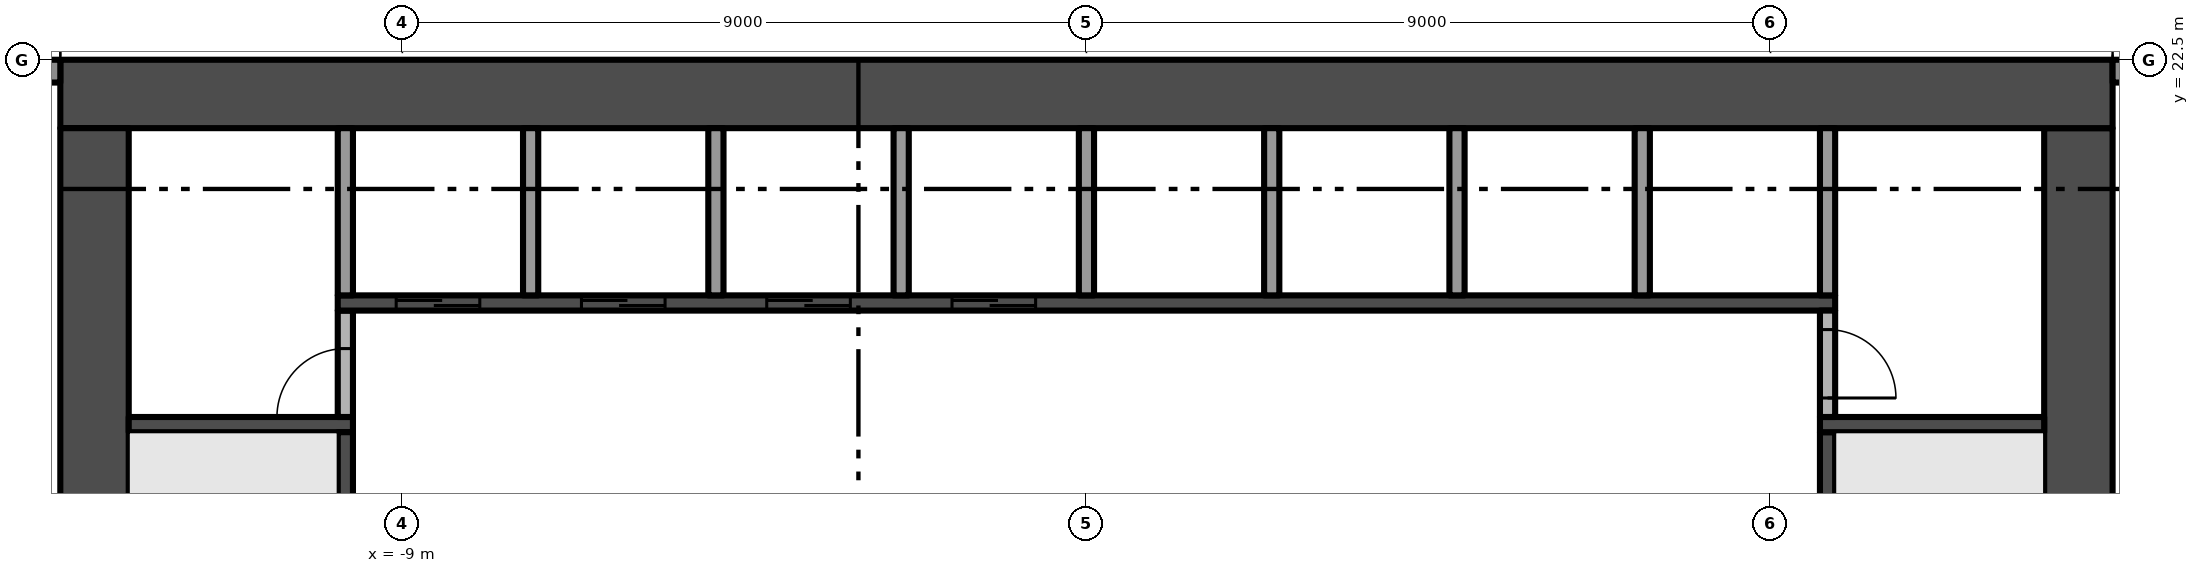
"""IFC4 building model, lengths in metres.
Left out: names, types, materials, properties, quantities, classifications, styles, units other than length and angle.
Written with IfcOpenShell. Run it as: python <this file> out.ifc"""

import sys

from ifc_helpers import new_model, si_unit, direction, frame, frame_2d, origin, place, context, subcontext, project, spatial, rectangle, extrude, element, fill, save


model = new_model("IFC4")
c1 = context("Model", 3, precision=1e-05, world=origin(), true_north=direction((0.0, 1.0)))
c2 = subcontext(c1, "Body", "Model", "MODEL_VIEW")
j1 = project(units=[si_unit("LENGTHUNIT", "METRE"), si_unit("PLANEANGLEUNIT", "RADIAN")], contexts=[c1])
p1 = place(None, origin())
s1 = spatial("IfcSite", under=j1, at=p1, CompositionType="ELEMENT")
p2 = place(p1, origin())
s2 = spatial("IfcBuilding", under=s1, at=p2, CompositionType="ELEMENT")
p3 = place(p2, frame((0.0, 0.0, 37.8)))
s3 = spatial("IfcBuildingStorey", under=s2, at=p3, CompositionType="ELEMENT", Elevation=37.8)
p4 = place(p3, frame((13.05, 5.4, -0.3), z_axis=(0.0, 0.0, 1.0), x_axis=(0.0, 1.0, 0.0)))
e1 = element("IfcWall", 1, at=p4, inside=s3, PredefinedType="SHEAR", context=c2, shape_type="SweptSolid", body=[
    extrude(rectangle(XDim=16.2, YDim=0.9, at=frame_2d((8.1, 0.0))), origin(), (0.0, 0.0, 1.0), 3.8),
])
p5 = place(p4, frame((6.0, 0.0, 0.3)))
e2 = element("IfcOpeningElement", 2, at=p5, cuts=e1, PredefinedType="OPENING", context=c2, shape_type="SweptSolid", body=[
    extrude(rectangle(XDim=1.2, YDim=2.2, at=frame_2d((0.6, 1.1))), frame((0.0, 0.46, 0.0), z_axis=(0.0, -1.0, 0.0), x_axis=(1.0, 0.0, 0.0)), (0.0, 0.0, 1.0), 0.92),
])
p6 = place(p3, frame((13.5, 22.05, -0.3), z_axis=(0.0, 0.0, 1.0), x_axis=(-1.0, 0.0, 0.0)))
e3 = element("IfcWall", 3, at=p6, inside=s3, PredefinedType="SHEAR", context=c2, shape_type="SweptSolid", body=[
    extrude(rectangle(XDim=27.0, YDim=0.9, at=frame_2d((13.5, 0.0))), origin(), (0.0, 0.0, 1.0), 3.8),
])
p7 = place(p3, frame((-13.05, 21.6, -0.3), z_axis=(0.0, 0.0, 1.0), x_axis=(0.0, -1.0, 0.0)))
e4 = element("IfcWall", 4, at=p7, inside=s3, PredefinedType="SHEAR", context=c2, shape_type="SweptSolid", body=[
    extrude(rectangle(XDim=16.2, YDim=0.9, at=frame_2d((8.1, 0.0))), origin(), (0.0, 0.0, 1.0), 3.8),
])
p8 = place(p7, frame((9.0, 0.0, 0.3)))
e5 = element("IfcOpeningElement", 5, at=p8, cuts=e4, PredefinedType="OPENING", context=c2, shape_type="SweptSolid", body=[
    extrude(rectangle(XDim=1.2, YDim=2.2, at=frame_2d((0.6, 1.1))), frame((0.0, 0.46, 0.0), z_axis=(0.0, -1.0, 0.0), x_axis=(1.0, 0.0, 0.0)), (0.0, 0.0, 1.0), 0.92),
])
p9 = place(p3, frame((13.5, 22.35, 0.0), z_axis=(0.0, 0.0, 1.0), x_axis=(1.0, 0.0, 0.0)))
e6 = element("IfcWall", 6, at=p9, inside=s3, PredefinedType="SOLIDWALL", context=c2, shape_type="SweptSolid", body=[
    extrude(rectangle(XDim=3.775, YDim=0.3, at=frame_2d((1.887, 0.0))), origin(), (0.0, 0.0, 1.0), 3.5),
])
p10 = place(p9, frame((0.85, 0.0, 0.0)))
e7 = element("IfcOpeningElement", 7, at=p10, cuts=e6, PredefinedType="OPENING", context=c2, shape_type="SweptSolid", body=[
    extrude(rectangle(XDim=2.6, YDim=2.4, at=frame_2d((1.3, 1.2))), frame((0.0, 0.16, 0.0), z_axis=(0.0, -1.0, 0.0), x_axis=(1.0, 0.0, 0.0)), (0.0, 0.0, 1.0), 0.32),
])
p11 = place(p3, frame((-17.275, 22.35, 0.0), z_axis=(0.0, 0.0, 1.0), x_axis=(1.0, 0.0, 0.0)))
e8 = element("IfcWall", 8, at=p11, inside=s3, PredefinedType="SOLIDWALL", context=c2, shape_type="SweptSolid", body=[
    extrude(rectangle(XDim=3.775, YDim=0.3, at=frame_2d((1.887, 0.0))), origin(), (0.0, 0.0, 1.0), 3.5),
])
p12 = place(p11, frame((0.325, 0.0, 0.45)))
e9 = element("IfcOpeningElement", 9, at=p12, cuts=e8, PredefinedType="OPENING", context=c2, shape_type="SweptSolid", body=[
    extrude(rectangle(XDim=2.6, YDim=2.65, at=frame_2d((1.3, 1.325))), frame((0.0, 0.16, 0.0), z_axis=(0.0, -1.0, 0.0), x_axis=(1.0, 0.0, 0.0)), (0.0, 0.0, 1.0), 0.32),
])
p13 = place(p3, frame((-12.6, 17.7, 0.0), z_axis=(0.0, 0.0, 1.0), x_axis=(1.0, 0.0, 0.0)))
e10 = element("IfcWall", 10, at=p13, inside=s3, PredefinedType="SHEAR", context=c2, shape_type="SweptSolid", body=[
    extrude(rectangle(XDim=2.95, YDim=0.2, at=frame_2d((1.475, 0.0))), origin(), (0.0, 0.0, 1.0), 3.5),
])
p14 = place(p3, frame((-9.75, 16.1, 0.0), z_axis=(0.0, 0.0, 1.0), x_axis=(0.0, 1.0, 0.0)))
e11 = element("IfcWall", 11, at=p14, inside=s3, PredefinedType="SHEAR", context=c2, shape_type="SweptSolid", body=[
    extrude(rectangle(XDim=1.5, YDim=0.2, at=frame_2d((0.75, 0.0))), origin(), (0.0, 0.0, 1.0), 3.5),
])
p15 = place(p3, frame((-9.75, 17.8, 0.0), z_axis=(0.0, 0.0, 1.0), x_axis=(0.0, 1.0, 0.0)))
e12 = element("IfcWall", 12, at=p15, inside=s3, PredefinedType="PARTITIONING", context=c2, shape_type="SweptSolid", body=[
    extrude(rectangle(XDim=1.4, YDim=0.2, at=frame_2d((0.7, 0.0))), origin(), (0.0, 0.0, 1.0), 3.5),
])
p16 = place(p15, origin())
e13 = element("IfcOpeningElement", 13, at=p16, cuts=e12, PredefinedType="OPENING", context=c2, shape_type="SweptSolid", body=[
    extrude(rectangle(XDim=0.9, YDim=2.1, at=frame_2d((0.45, 1.05))), frame((0.0, 0.11, 0.0), z_axis=(0.0, -1.0, 0.0), x_axis=(1.0, 0.0, 0.0)), (0.0, 0.0, 1.0), 0.22),
])
p17 = place(p3, frame((-9.85, 19.3, 0.0), z_axis=(0.0, 0.0, 1.0), x_axis=(1.0, 0.0, 0.0)))
e14 = element("IfcWall", 14, at=p17, inside=s3, PredefinedType="SHEAR", context=c2, shape_type="SweptSolid", body=[
    extrude(rectangle(XDim=19.7, YDim=0.2, at=frame_2d((9.85, 0.0))), origin(), (0.0, 0.0, 1.0), 3.5),
])
p18 = place(p17, frame((0.769, 0.0, 0.0)))
e15 = element("IfcOpeningElement", 15, at=p18, cuts=e14, PredefinedType="OPENING", context=c2, shape_type="SweptSolid", body=[
    extrude(rectangle(XDim=1.1, YDim=2.1, at=frame_2d((0.55, 1.05))), frame((0.0, 0.11, 0.0), z_axis=(0.0, -1.0, 0.0), x_axis=(1.0, 0.0, 0.0)), (0.0, 0.0, 1.0), 0.22),
])
p19 = place(p17, frame((3.206, 0.0, 0.0)))
e16 = element("IfcOpeningElement", 16, at=p19, cuts=e14, PredefinedType="OPENING", context=c2, shape_type="SweptSolid", body=[
    extrude(rectangle(XDim=1.1, YDim=2.1, at=frame_2d((0.55, 1.05))), frame((0.0, 0.11, 0.0), z_axis=(0.0, -1.0, 0.0), x_axis=(1.0, 0.0, 0.0)), (0.0, 0.0, 1.0), 0.22),
])
p20 = place(p17, frame((5.644, 0.0, 0.0)))
e17 = element("IfcOpeningElement", 17, at=p20, cuts=e14, PredefinedType="OPENING", context=c2, shape_type="SweptSolid", body=[
    extrude(rectangle(XDim=1.1, YDim=2.1, at=frame_2d((0.55, 1.05))), frame((0.0, 0.11, 0.0), z_axis=(0.0, -1.0, 0.0), x_axis=(1.0, 0.0, 0.0)), (0.0, 0.0, 1.0), 0.22),
])
p21 = place(p17, frame((8.081, 0.0, 0.0)))
e18 = element("IfcOpeningElement", 18, at=p21, cuts=e14, PredefinedType="OPENING", context=c2, shape_type="SweptSolid", body=[
    extrude(rectangle(XDim=1.1, YDim=2.1, at=frame_2d((0.55, 1.05))), frame((0.0, 0.11, 0.0), z_axis=(0.0, -1.0, 0.0), x_axis=(1.0, 0.0, 0.0)), (0.0, 0.0, 1.0), 0.22),
])
for number, where, z_axis, x_axis in (
    (19, (-9.75, 19.4, 0.0), (0.0, 0.0, 1.0), (0.0, 1.0, 0.0)),
    (20, (-7.312, 19.4, 0.0), (0.0, 0.0, 1.0), (0.0, 1.0, 0.0)),
    (21, (-4.875, 19.4, 0.0), (0.0, 0.0, 1.0), (0.0, 1.0, 0.0)),
    (22, (-2.438, 19.4, 0.0), (0.0, 0.0, 1.0), (0.0, 1.0, 0.0)),
    (23, (0.0, 19.4, 0.0), (0.0, 0.0, 1.0), (0.0, 1.0, 0.0)),
    (24, (2.438, 19.4, 0.0), (0.0, 0.0, 1.0), (0.0, 1.0, 0.0)),
    (25, (4.875, 19.4, 0.0), (0.0, 0.0, 1.0), (0.0, 1.0, 0.0)),
    (26, (7.312, 19.4, 0.0), (0.0, 0.0, 1.0), (0.0, 1.0, 0.0)),
):
    element("IfcWall", number, at=place(p3, frame(where, z_axis=z_axis, x_axis=x_axis)), inside=s3, PredefinedType="PARTITIONING", context=c2, shape_type="SweptSolid", body=[
        extrude(rectangle(XDim=2.2, YDim=0.2, at=frame_2d((1.1, 0.0))), origin(), (0.0, 0.0, 1.0), 3.5),
    ])
p22 = place(p3, frame((9.75, 16.1, 0.0), z_axis=(0.0, 0.0, 1.0), x_axis=(0.0, 1.0, 0.0)))
e27 = element("IfcWall", 27, at=p22, inside=s3, PredefinedType="SHEAR", context=c2, shape_type="SweptSolid", body=[
    extrude(rectangle(XDim=1.5, YDim=0.2, at=frame_2d((0.75, 0.0))), origin(), (0.0, 0.0, 1.0), 3.5),
])
p23 = place(p3, frame((9.65, 17.7, 0.0), z_axis=(0.0, 0.0, 1.0), x_axis=(1.0, 0.0, 0.0)))
e28 = element("IfcWall", 28, at=p23, inside=s3, PredefinedType="SHEAR", context=c2, shape_type="SweptSolid", body=[
    extrude(rectangle(XDim=2.95, YDim=0.2, at=frame_2d((1.475, 0.0))), origin(), (0.0, 0.0, 1.0), 3.5),
])
p24 = place(p3, frame((9.75, 19.2, 0.0), z_axis=(0.0, 0.0, 1.0), x_axis=(0.0, -1.0, 0.0)))
e29 = element("IfcWall", 29, at=p24, inside=s3, PredefinedType="PARTITIONING", context=c2, shape_type="SweptSolid", body=[
    extrude(rectangle(XDim=1.4, YDim=0.2, at=frame_2d((0.7, 0.0))), origin(), (0.0, 0.0, 1.0), 3.5),
])
p25 = place(p24, frame((0.25, 0.0, 0.0)))
e30 = element("IfcOpeningElement", 30, at=p25, cuts=e29, PredefinedType="OPENING", context=c2, shape_type="SweptSolid", body=[
    extrude(rectangle(XDim=0.9, YDim=2.1, at=frame_2d((0.45, 1.05))), frame((0.0, 0.11, 0.0), z_axis=(0.0, -1.0, 0.0), x_axis=(1.0, 0.0, 0.0)), (0.0, 0.0, 1.0), 0.22),
])
p26 = place(p3, frame((9.75, 19.4, 0.0), z_axis=(0.0, 0.0, 1.0), x_axis=(0.0, 1.0, 0.0)))
e31 = element("IfcWall", 31, at=p26, inside=s3, PredefinedType="PARTITIONING", context=c2, shape_type="SweptSolid", body=[
    extrude(rectangle(XDim=2.2, YDim=0.2, at=frame_2d((1.1, 0.0))), origin(), (0.0, 0.0, 1.0), 3.5),
])
p27 = place(p18, origin())
e32 = element("IfcDoor", 32, at=p27, inside=s3, OperationType="SLIDING_TO_LEFT", PredefinedType="DOOR", context=c2, shape_type="SweptSolid", body=[
    extrude(rectangle(XDim=1.1, YDim=2.1, at=frame_2d((0.55, 1.05))), frame((0.0, 0.025, 0.0), z_axis=(0.0, -1.0, 0.0), x_axis=(1.0, 0.0, 0.0)), (0.0, 0.0, 1.0), 0.05),
])
fill(e15, e32)
p28 = place(p19, origin())
e33 = element("IfcDoor", 33, at=p28, inside=s3, OperationType="SLIDING_TO_LEFT", PredefinedType="DOOR", context=c2, shape_type="SweptSolid", body=[
    extrude(rectangle(XDim=1.1, YDim=2.1, at=frame_2d((0.55, 1.05))), frame((0.0, 0.025, 0.0), z_axis=(0.0, -1.0, 0.0), x_axis=(1.0, 0.0, 0.0)), (0.0, 0.0, 1.0), 0.05),
])
fill(e16, e33)
p29 = place(p20, origin())
e34 = element("IfcDoor", 34, at=p29, inside=s3, OperationType="SLIDING_TO_LEFT", PredefinedType="DOOR", context=c2, shape_type="SweptSolid", body=[
    extrude(rectangle(XDim=1.1, YDim=2.1, at=frame_2d((0.55, 1.05))), frame((0.0, 0.025, 0.0), z_axis=(0.0, -1.0, 0.0), x_axis=(1.0, 0.0, 0.0)), (0.0, 0.0, 1.0), 0.05),
])
fill(e17, e34)
p30 = place(p21, origin())
e35 = element("IfcDoor", 35, at=p30, inside=s3, OperationType="SLIDING_TO_LEFT", PredefinedType="DOOR", context=c2, shape_type="SweptSolid", body=[
    extrude(rectangle(XDim=1.1, YDim=2.1, at=frame_2d((0.55, 1.05))), frame((0.0, 0.025, 0.0), z_axis=(0.0, -1.0, 0.0), x_axis=(1.0, 0.0, 0.0)), (0.0, 0.0, 1.0), 0.05),
])
fill(e18, e35)
p31 = place(p16, origin())
e36 = element("IfcDoor", 36, at=p31, inside=s3, OperationType="SINGLE_SWING_LEFT", PredefinedType="DOOR", context=c2, shape_type="SweptSolid", body=[
    extrude(rectangle(XDim=0.9, YDim=2.1, at=frame_2d((0.45, 1.05))), frame((0.0, 0.025, 0.0), z_axis=(0.0, -1.0, 0.0), x_axis=(1.0, 0.0, 0.0)), (0.0, 0.0, 1.0), 0.05),
])
fill(e13, e36)
p32 = place(p25, origin())
e37 = element("IfcDoor", 37, at=p32, inside=s3, OperationType="SINGLE_SWING_RIGHT", PredefinedType="DOOR", context=c2, shape_type="SweptSolid", body=[
    extrude(rectangle(XDim=0.9, YDim=2.1, at=frame_2d((0.45, 1.05))), frame((0.0, 0.025, 0.0), z_axis=(0.0, -1.0, 0.0), x_axis=(1.0, 0.0, 0.0)), (0.0, 0.0, 1.0), 0.05),
])
fill(e30, e37)
save(model, sys.argv[1])
